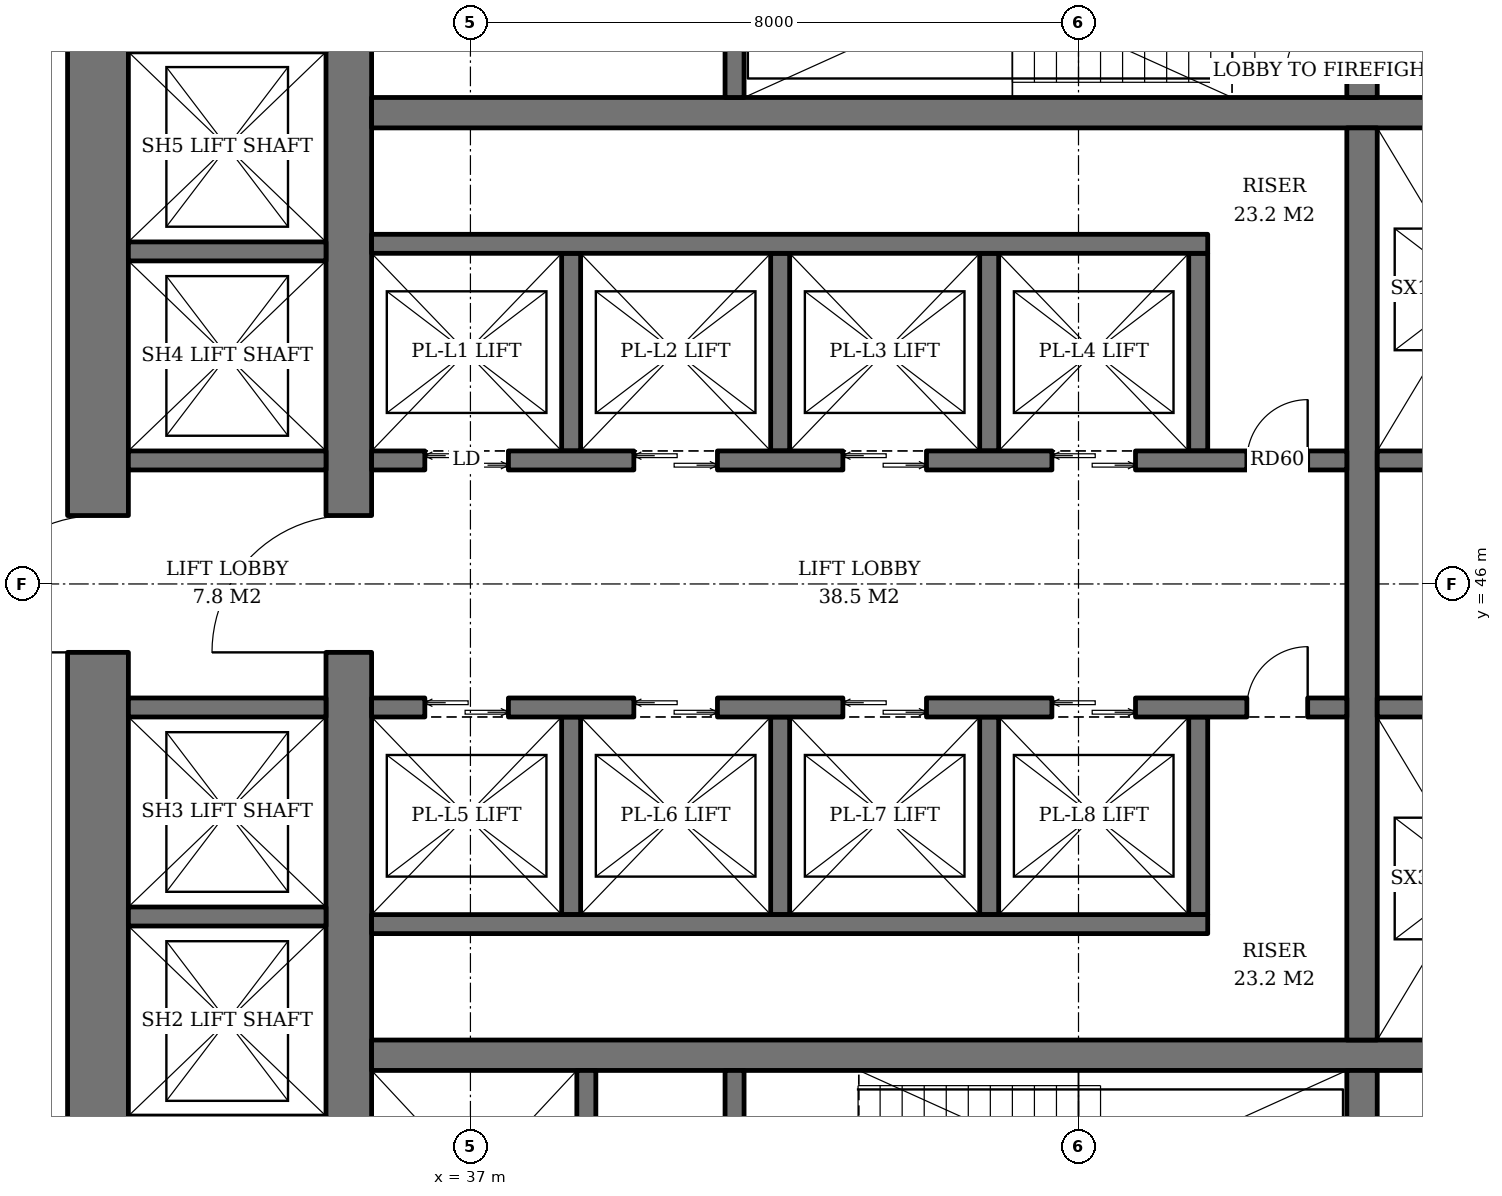
"""IFC4 building model, lengths in metres.
Left out: names, types, materials, properties, quantities, classifications, styles, units other than length and angle.
Written with IfcOpenShell. Run it as: python <this file> out.ifc"""

import sys

from ifc_helpers import new_model, si_unit, direction, frame, frame_2d, origin, place, context, subcontext, project, spatial, rectangle, extrude, element, fill, save


model = new_model("IFC4")
c1 = context("Model", 3, precision=1e-05, world=origin(), true_north=direction((0.0, 1.0)))
c2 = subcontext(c1, "Body", "Model", "MODEL_VIEW")
j1 = project(units=[si_unit("LENGTHUNIT", "METRE"), si_unit("PLANEANGLEUNIT", "RADIAN")], contexts=[c1])
p1 = place(None, origin())
s1 = spatial("IfcSite", under=j1, at=p1, CompositionType="ELEMENT")
p2 = place(p1, origin())
s2 = spatial("IfcBuilding", under=s1, at=p2, CompositionType="ELEMENT")
p3 = place(p2, frame((0.0, 0.0, 55.2)))
s3 = spatial("IfcBuildingStorey", under=s2, at=p3, CompositionType="ELEMENT", Elevation=55.2)
p4 = place(p3, frame((35.4, 36.7, 0.0), z_axis=(0.0, 0.0, 1.0), x_axis=(0.0, 1.0, 0.0)))
e1 = element("IfcWall", 1, at=p4, inside=s3, PredefinedType="SHEAR", context=c2, shape_type="SweptSolid", body=[
    extrude(rectangle(XDim=18.6, YDim=0.6, at=frame_2d((9.3, 0.0))), origin(), (0.0, 0.0, 1.0), 3.8),
])
p5 = place(p4, frame((8.4, 0.0, 0.0)))
e2 = element("IfcOpeningElement", 2, at=p5, cuts=e1, PredefinedType="OPENING", context=c2, shape_type="SweptSolid", body=[
    extrude(rectangle(XDim=1.8, YDim=2.4, at=frame_2d((0.9, 1.2))), frame((0.0, 0.31, 0.0), z_axis=(0.0, -1.0, 0.0), x_axis=(1.0, 0.0, 0.0)), (0.0, 0.0, 1.0), 0.62),
])
p6 = place(p3, frame((32.1, 33.5, 0.0), z_axis=(0.0, 0.0, 1.0), x_axis=(0.0, 1.0, 0.0)))
e3 = element("IfcWall", 3, at=p6, inside=s3, PredefinedType="SHEAR", context=c2, shape_type="SweptSolid", body=[
    extrude(rectangle(XDim=25.0, YDim=0.8, at=frame_2d((12.5, 0.0))), origin(), (0.0, 0.0, 1.0), 3.8),
])
p7 = place(p6, frame((11.6, 0.0, 0.0)))
e4 = element("IfcOpeningElement", 4, at=p7, cuts=e3, PredefinedType="OPENING", context=c2, shape_type="SweptSolid", body=[
    extrude(rectangle(XDim=1.8, YDim=2.4, at=frame_2d((0.9, 1.2))), frame((0.0, 0.41, 0.0), z_axis=(0.0, -1.0, 0.0), x_axis=(1.0, 0.0, 0.0)), (0.0, 0.0, 1.0), 0.82),
])
for number, where, z_axis, x_axis in (
    (5, (35.7, 39.8, 0.0), (0.0, 0.0, 1.0), (1.0, 0.0, 0.0)),
    (6, (35.7, 52.2, 0.0), (0.0, 0.0, 1.0), (1.0, 0.0, 0.0)),
):
    element("IfcWall", number, at=place(p3, frame(where, z_axis=z_axis, x_axis=x_axis)), inside=s3, PredefinedType="SHEAR", context=c2, shape_type="SweptSolid", body=[
        extrude(rectangle(XDim=18.6, YDim=0.4, at=frame_2d((9.3, 0.0))), origin(), (0.0, 0.0, 1.0), 3.8),
    ])
p8 = place(p3, frame((48.73, 36.7, 0.0), z_axis=(0.0, 0.0, 1.0), x_axis=(0.0, 1.0, 0.0)))
e7 = element("IfcWall", 7, at=p8, inside=s3, PredefinedType="SHEAR", context=c2, shape_type="SweptSolid", body=[
    extrude(rectangle(XDim=2.9, YDim=0.4, at=frame_2d((1.45, 0.0))), origin(), (0.0, 0.0, 1.0), 3.8),
])
p9 = place(p3, frame((48.73, 40.0, 0.0), z_axis=(0.0, 0.0, 1.0), x_axis=(0.0, 1.0, 0.0)))
e8 = element("IfcWall", 8, at=p9, inside=s3, PredefinedType="SHEAR", context=c2, shape_type="SweptSolid", body=[
    extrude(rectangle(XDim=12.0, YDim=0.4, at=frame_2d((6.0, 0.0))), origin(), (0.0, 0.0, 1.0), 3.8),
])
p10 = place(p3, frame((48.73, 52.4, 0.0), z_axis=(0.0, 0.0, 1.0), x_axis=(0.0, 1.0, 0.0)))
e9 = element("IfcWall", 9, at=p10, inside=s3, PredefinedType="SHEAR", context=c2, shape_type="SweptSolid", body=[
    extrude(rectangle(XDim=2.9, YDim=0.4, at=frame_2d((1.45, 0.0))), origin(), (0.0, 0.0, 1.0), 3.8),
])
p11 = place(p10, frame((0.3, 0.0, 0.0)))
e10 = element("IfcOpeningElement", 10, at=p11, cuts=e9, PredefinedType="OPENING", context=c2, shape_type="SweptSolid", body=[
    extrude(rectangle(XDim=1.0, YDim=2.1, at=frame_2d((0.5, 1.05))), frame((0.0, 0.21, 0.0), z_axis=(0.0, -1.0, 0.0), x_axis=(1.0, 0.0, 0.0)), (0.0, 0.0, 1.0), 0.42),
])
p12 = place(p3, frame((38.525, 36.7, 0.0), z_axis=(0.0, 0.0, 1.0), x_axis=(0.0, 1.0, 0.0)))
e11 = element("IfcWall", 11, at=p12, inside=s3, PredefinedType="SHEAR", context=c2, shape_type="SweptSolid", body=[
    extrude(rectangle(XDim=2.9, YDim=0.25, at=frame_2d((1.45, 0.0))), origin(), (0.0, 0.0, 1.0), 3.8),
])
p13 = place(p12, frame((0.8, 0.0, 0.0)))
e12 = element("IfcOpeningElement", 12, at=p13, cuts=e11, PredefinedType="OPENING", context=c2, shape_type="SweptSolid", body=[
    extrude(rectangle(XDim=1.3, YDim=2.2, at=frame_2d((0.65, 1.1))), frame((0.0, 0.135, 0.0), z_axis=(0.0, -1.0, 0.0), x_axis=(1.0, 0.0, 0.0)), (0.0, 0.0, 1.0), 0.27),
])
p14 = place(p3, frame((40.475, 36.7, 0.0), z_axis=(0.0, 0.0, 1.0), x_axis=(0.0, 1.0, 0.0)))
e13 = element("IfcWall", 13, at=p14, inside=s3, PredefinedType="SHEAR", context=c2, shape_type="SweptSolid", body=[
    extrude(rectangle(XDim=2.9, YDim=0.25, at=frame_2d((1.45, 0.0))), origin(), (0.0, 0.0, 1.0), 3.8),
])
p15 = place(p14, frame((0.75, 0.0, 0.0)))
e14 = element("IfcOpeningElement", 14, at=p15, cuts=e13, PredefinedType="OPENING", context=c2, shape_type="SweptSolid", body=[
    extrude(rectangle(XDim=1.2, YDim=2.1, at=frame_2d((0.6, 1.05))), frame((0.0, 0.135, 0.0), z_axis=(0.0, -1.0, 0.0), x_axis=(1.0, 0.0, 0.0)), (0.0, 0.0, 1.0), 0.27),
])
p16 = place(p3, frame((40.475, 52.4, 0.0), z_axis=(0.0, 0.0, 1.0), x_axis=(0.0, 1.0, 0.0)))
e15 = element("IfcWall", 15, at=p16, inside=s3, PredefinedType="SHEAR", context=c2, shape_type="SweptSolid", body=[
    extrude(rectangle(XDim=2.9, YDim=0.25, at=frame_2d((1.45, 0.0))), origin(), (0.0, 0.0, 1.0), 3.8),
])
for number, where, z_axis, x_axis in (
    (16, (38.325, 47.75, 0.0), (0.0, 0.0, 1.0), (0.0, 1.0, 0.0)),
    (17, (41.075, 47.75, 0.0), (0.0, 0.0, 1.0), (0.0, 1.0, 0.0)),
    (18, (43.825, 47.75, 0.0), (0.0, 0.0, 1.0), (0.0, 1.0, 0.0)),
    (19, (46.575, 47.75, 0.0), (0.0, 0.0, 1.0), (0.0, 1.0, 0.0)),
):
    element("IfcWall", number, at=place(p3, frame(where, z_axis=z_axis, x_axis=x_axis)), inside=s3, PredefinedType="SHEAR", context=c2, shape_type="SweptSolid", body=[
        extrude(rectangle(XDim=2.6, YDim=0.25, at=frame_2d((1.3, 0.0))), origin(), (0.0, 0.0, 1.0), 3.8),
    ])
p17 = place(p3, frame((35.7, 50.475, 0.0), z_axis=(0.0, 0.0, 1.0), x_axis=(1.0, 0.0, 0.0)))
e20 = element("IfcWall", 20, at=p17, inside=s3, PredefinedType="SHEAR", context=c2, shape_type="SweptSolid", body=[
    extrude(rectangle(XDim=11.0, YDim=0.25, at=frame_2d((5.5, 0.0))), origin(), (0.0, 0.0, 1.0), 3.8),
])
p18 = place(p3, frame((35.7, 47.625, 0.0), z_axis=(0.0, 0.0, 1.0), x_axis=(1.0, 0.0, 0.0)))
e21 = element("IfcWall", 21, at=p18, inside=s3, PredefinedType="SHEAR", context=c2, shape_type="SweptSolid", body=[
    extrude(rectangle(XDim=12.83, YDim=0.25, at=frame_2d((6.415, 0.0))), origin(), (0.0, 0.0, 1.0), 3.8),
])
p19 = place(p18, frame((0.7, 0.0, 0.0)))
e22 = element("IfcOpeningElement", 22, at=p19, cuts=e21, PredefinedType="OPENING", context=c2, shape_type="SweptSolid", body=[
    extrude(rectangle(XDim=1.1, YDim=2.2, at=frame_2d((0.55, 1.1))), frame((0.0, 0.135, 0.0), z_axis=(0.0, -1.0, 0.0), x_axis=(1.0, 0.0, 0.0)), (0.0, 0.0, 1.0), 0.27),
])
p20 = place(p18, frame((3.45, 0.0, 0.0)))
e23 = element("IfcOpeningElement", 23, at=p20, cuts=e21, PredefinedType="OPENING", context=c2, shape_type="SweptSolid", body=[
    extrude(rectangle(XDim=1.1, YDim=2.2, at=frame_2d((0.55, 1.1))), frame((0.0, 0.135, 0.0), z_axis=(0.0, -1.0, 0.0), x_axis=(1.0, 0.0, 0.0)), (0.0, 0.0, 1.0), 0.27),
])
p21 = place(p18, frame((6.2, 0.0, 0.0)))
e24 = element("IfcOpeningElement", 24, at=p21, cuts=e21, PredefinedType="OPENING", context=c2, shape_type="SweptSolid", body=[
    extrude(rectangle(XDim=1.1, YDim=2.2, at=frame_2d((0.55, 1.1))), frame((0.0, 0.135, 0.0), z_axis=(0.0, -1.0, 0.0), x_axis=(1.0, 0.0, 0.0)), (0.0, 0.0, 1.0), 0.27),
])
p22 = place(p18, frame((8.95, 0.0, 0.0)))
e25 = element("IfcOpeningElement", 25, at=p22, cuts=e21, PredefinedType="OPENING", context=c2, shape_type="SweptSolid", body=[
    extrude(rectangle(XDim=1.1, YDim=2.2, at=frame_2d((0.55, 1.1))), frame((0.0, 0.135, 0.0), z_axis=(0.0, -1.0, 0.0), x_axis=(1.0, 0.0, 0.0)), (0.0, 0.0, 1.0), 0.27),
])
p23 = place(p18, frame((11.515, 0.0, 0.0)))
e26 = element("IfcOpeningElement", 26, at=p23, cuts=e21, PredefinedType="OPENING", context=c2, shape_type="SweptSolid", body=[
    extrude(rectangle(XDim=0.8, YDim=2.0, at=frame_2d((0.4, 1.0))), frame((0.0, 0.135, 0.0), z_axis=(0.0, -1.0, 0.0), x_axis=(1.0, 0.0, 0.0)), (0.0, 0.0, 1.0), 0.27),
])
for number, where, z_axis, x_axis in (
    (27, (38.325, 44.25, 0.0), (0.0, 0.0, 1.0), (0.0, -1.0, 0.0)),
    (28, (41.075, 44.25, 0.0), (0.0, 0.0, 1.0), (0.0, -1.0, 0.0)),
    (29, (43.825, 44.25, 0.0), (0.0, 0.0, 1.0), (0.0, -1.0, 0.0)),
    (30, (46.575, 44.25, 0.0), (0.0, 0.0, 1.0), (0.0, -1.0, 0.0)),
):
    element("IfcWall", number, at=place(p3, frame(where, z_axis=z_axis, x_axis=x_axis)), inside=s3, PredefinedType="SHEAR", context=c2, shape_type="SweptSolid", body=[
        extrude(rectangle(XDim=2.6, YDim=0.25, at=frame_2d((1.3, 0.0))), origin(), (0.0, 0.0, 1.0), 3.8),
    ])
p24 = place(p3, frame((35.7, 41.525, 0.0), z_axis=(0.0, 0.0, 1.0), x_axis=(1.0, 0.0, 0.0)))
e31 = element("IfcWall", 31, at=p24, inside=s3, PredefinedType="SHEAR", context=c2, shape_type="SweptSolid", body=[
    extrude(rectangle(XDim=11.0, YDim=0.25, at=frame_2d((5.5, 0.0))), origin(), (0.0, 0.0, 1.0), 3.8),
])
p25 = place(p3, frame((35.7, 44.375, 0.0), z_axis=(0.0, 0.0, 1.0), x_axis=(1.0, 0.0, 0.0)))
e32 = element("IfcWall", 32, at=p25, inside=s3, PredefinedType="SHEAR", context=c2, shape_type="SweptSolid", body=[
    extrude(rectangle(XDim=12.83, YDim=0.25, at=frame_2d((6.415, 0.0))), origin(), (0.0, 0.0, 1.0), 3.8),
])
p26 = place(p25, frame((0.7, 0.0, 0.0)))
e33 = element("IfcOpeningElement", 33, at=p26, cuts=e32, PredefinedType="OPENING", context=c2, shape_type="SweptSolid", body=[
    extrude(rectangle(XDim=1.1, YDim=2.2, at=frame_2d((0.55, 1.1))), frame((0.0, 0.135, 0.0), z_axis=(0.0, -1.0, 0.0), x_axis=(1.0, 0.0, 0.0)), (0.0, 0.0, 1.0), 0.27),
])
p27 = place(p25, frame((3.45, 0.0, 0.0)))
e34 = element("IfcOpeningElement", 34, at=p27, cuts=e32, PredefinedType="OPENING", context=c2, shape_type="SweptSolid", body=[
    extrude(rectangle(XDim=1.1, YDim=2.2, at=frame_2d((0.55, 1.1))), frame((0.0, 0.135, 0.0), z_axis=(0.0, -1.0, 0.0), x_axis=(1.0, 0.0, 0.0)), (0.0, 0.0, 1.0), 0.27),
])
p28 = place(p25, frame((6.2, 0.0, 0.0)))
e35 = element("IfcOpeningElement", 35, at=p28, cuts=e32, PredefinedType="OPENING", context=c2, shape_type="SweptSolid", body=[
    extrude(rectangle(XDim=1.1, YDim=2.2, at=frame_2d((0.55, 1.1))), frame((0.0, 0.135, 0.0), z_axis=(0.0, -1.0, 0.0), x_axis=(1.0, 0.0, 0.0)), (0.0, 0.0, 1.0), 0.27),
])
p29 = place(p25, frame((8.95, 0.0, 0.0)))
e36 = element("IfcOpeningElement", 36, at=p29, cuts=e32, PredefinedType="OPENING", context=c2, shape_type="SweptSolid", body=[
    extrude(rectangle(XDim=1.1, YDim=2.2, at=frame_2d((0.55, 1.1))), frame((0.0, 0.135, 0.0), z_axis=(0.0, -1.0, 0.0), x_axis=(1.0, 0.0, 0.0)), (0.0, 0.0, 1.0), 0.27),
])
p30 = place(p25, frame((11.515, 0.0, 0.0)))
e37 = element("IfcOpeningElement", 37, at=p30, cuts=e32, PredefinedType="OPENING", context=c2, shape_type="SweptSolid", body=[
    extrude(rectangle(XDim=0.8, YDim=2.0, at=frame_2d((0.4, 1.0))), frame((0.0, 0.135, 0.0), z_axis=(0.0, -1.0, 0.0), x_axis=(1.0, 0.0, 0.0)), (0.0, 0.0, 1.0), 0.27),
])
for number, where, z_axis, x_axis in (
    (38, (48.93, 47.625, 0.0), (0.0, 0.0, 1.0), (1.0, 0.0, 0.0)),
    (39, (48.93, 44.375, 0.0), (0.0, 0.0, 1.0), (1.0, 0.0, 0.0)),
):
    element("IfcWall", number, at=place(p3, frame(where, z_axis=z_axis, x_axis=x_axis)), inside=s3, PredefinedType="SHEAR", context=c2, shape_type="SweptSolid", body=[
        extrude(rectangle(XDim=5.37, YDim=0.25, at=frame_2d((2.685, 0.0))), origin(), (0.0, 0.0, 1.0), 3.8),
    ])
for number, where, z_axis, x_axis in (
    (40, (32.5, 41.625, 0.0), (0.0, 0.0, 1.0), (1.0, 0.0, 0.0)),
    (41, (32.5, 44.375, 0.0), (0.0, 0.0, 1.0), (1.0, 0.0, 0.0)),
    (42, (32.5, 47.625, 0.0), (0.0, 0.0, 1.0), (1.0, 0.0, 0.0)),
    (43, (32.5, 50.375, 0.0), (0.0, 0.0, 1.0), (1.0, 0.0, 0.0)),
):
    element("IfcWall", number, at=place(p3, frame(where, z_axis=z_axis, x_axis=x_axis)), inside=s3, PredefinedType="SHEAR", context=c2, shape_type="SweptSolid", body=[
        extrude(rectangle(XDim=2.6, YDim=0.25, at=frame_2d((1.3, 0.0))), origin(), (0.0, 0.0, 1.0), 3.8),
    ])
p31 = place(p19, origin())
e44 = element("IfcDoor", 44, at=p31, inside=s3, OperationType="DOUBLE_DOOR_SLIDING", PredefinedType="DOOR", context=c2, shape_type="SweptSolid", body=[
    extrude(rectangle(XDim=1.1, YDim=2.2, at=frame_2d((0.55, 1.1))), frame((0.0, 0.025, 0.0), z_axis=(0.0, -1.0, 0.0), x_axis=(1.0, 0.0, 0.0)), (0.0, 0.0, 1.0), 0.05),
])
fill(e22, e44)
p32 = place(p20, origin())
e45 = element("IfcDoor", 45, at=p32, inside=s3, OperationType="DOUBLE_DOOR_SLIDING", PredefinedType="DOOR", context=c2, shape_type="SweptSolid", body=[
    extrude(rectangle(XDim=1.1, YDim=2.2, at=frame_2d((0.55, 1.1))), frame((0.0, 0.025, 0.0), z_axis=(0.0, -1.0, 0.0), x_axis=(1.0, 0.0, 0.0)), (0.0, 0.0, 1.0), 0.05),
])
fill(e23, e45)
p33 = place(p21, origin())
e46 = element("IfcDoor", 46, at=p33, inside=s3, OperationType="DOUBLE_DOOR_SLIDING", PredefinedType="DOOR", context=c2, shape_type="SweptSolid", body=[
    extrude(rectangle(XDim=1.1, YDim=2.2, at=frame_2d((0.55, 1.1))), frame((0.0, 0.025, 0.0), z_axis=(0.0, -1.0, 0.0), x_axis=(1.0, 0.0, 0.0)), (0.0, 0.0, 1.0), 0.05),
])
fill(e24, e46)
p34 = place(p22, origin())
e47 = element("IfcDoor", 47, at=p34, inside=s3, OperationType="DOUBLE_DOOR_SLIDING", PredefinedType="DOOR", context=c2, shape_type="SweptSolid", body=[
    extrude(rectangle(XDim=1.1, YDim=2.2, at=frame_2d((0.55, 1.1))), frame((0.0, 0.025, 0.0), z_axis=(0.0, -1.0, 0.0), x_axis=(1.0, 0.0, 0.0)), (0.0, 0.0, 1.0), 0.05),
])
fill(e25, e47)
p35 = place(p23, origin())
e48 = element("IfcDoor", 48, at=p35, inside=s3, OperationType="SINGLE_SWING_RIGHT", PredefinedType="DOOR", context=c2, shape_type="SweptSolid", body=[
    extrude(rectangle(XDim=0.8, YDim=2.0, at=frame_2d((0.4, 1.0))), frame((0.0, 0.025, 0.0), z_axis=(0.0, -1.0, 0.0), x_axis=(1.0, 0.0, 0.0)), (0.0, 0.0, 1.0), 0.05),
])
fill(e26, e48)
p36 = place(p26, origin())
e49 = element("IfcDoor", 49, at=p36, inside=s3, OperationType="DOUBLE_DOOR_SLIDING", PredefinedType="DOOR", context=c2, shape_type="SweptSolid", body=[
    extrude(rectangle(XDim=1.1, YDim=2.2, at=frame_2d((0.55, 1.1))), frame((0.0, 0.025, 0.0), z_axis=(0.0, -1.0, 0.0), x_axis=(1.0, 0.0, 0.0)), (0.0, 0.0, 1.0), 0.05),
])
fill(e33, e49)
p37 = place(p27, origin())
e50 = element("IfcDoor", 50, at=p37, inside=s3, OperationType="DOUBLE_DOOR_SLIDING", PredefinedType="DOOR", context=c2, shape_type="SweptSolid", body=[
    extrude(rectangle(XDim=1.1, YDim=2.2, at=frame_2d((0.55, 1.1))), frame((0.0, 0.025, 0.0), z_axis=(0.0, -1.0, 0.0), x_axis=(1.0, 0.0, 0.0)), (0.0, 0.0, 1.0), 0.05),
])
fill(e34, e50)
p38 = place(p28, origin())
e51 = element("IfcDoor", 51, at=p38, inside=s3, OperationType="DOUBLE_DOOR_SLIDING", PredefinedType="DOOR", context=c2, shape_type="SweptSolid", body=[
    extrude(rectangle(XDim=1.1, YDim=2.2, at=frame_2d((0.55, 1.1))), frame((0.0, 0.025, 0.0), z_axis=(0.0, -1.0, 0.0), x_axis=(1.0, 0.0, 0.0)), (0.0, 0.0, 1.0), 0.05),
])
fill(e35, e51)
p39 = place(p29, origin())
e52 = element("IfcDoor", 52, at=p39, inside=s3, OperationType="DOUBLE_DOOR_SLIDING", PredefinedType="DOOR", context=c2, shape_type="SweptSolid", body=[
    extrude(rectangle(XDim=1.1, YDim=2.2, at=frame_2d((0.55, 1.1))), frame((0.0, 0.025, 0.0), z_axis=(0.0, -1.0, 0.0), x_axis=(1.0, 0.0, 0.0)), (0.0, 0.0, 1.0), 0.05),
])
fill(e36, e52)
p40 = place(p30, origin())
e53 = element("IfcDoor", 53, at=p40, inside=s3, OperationType="SINGLE_SWING_RIGHT", PredefinedType="DOOR", context=c2, shape_type="SweptSolid", body=[
    extrude(rectangle(XDim=0.8, YDim=2.0, at=frame_2d((0.4, 1.0))), frame((0.0, 0.025, 0.0), z_axis=(0.0, -1.0, 0.0), x_axis=(1.0, 0.0, 0.0)), (0.0, 0.0, 1.0), 0.05),
])
fill(e37, e53)
p41 = place(p11, origin())
e54 = element("IfcDoor", 54, at=p41, inside=s3, OperationType="SINGLE_SWING_LEFT", PredefinedType="DOOR", context=c2, shape_type="SweptSolid", body=[
    extrude(rectangle(XDim=1.0, YDim=2.1, at=frame_2d((0.5, 1.05))), frame((0.0, 0.025, 0.0), z_axis=(0.0, -1.0, 0.0), x_axis=(1.0, 0.0, 0.0)), (0.0, 0.0, 1.0), 0.05),
])
fill(e10, e54)
p42 = place(p5, origin())
e55 = element("IfcDoor", 55, at=p42, inside=s3, OperationType="DOUBLE_DOOR_SINGLE_SWING", PredefinedType="DOOR", context=c2, shape_type="SweptSolid", body=[
    extrude(rectangle(XDim=1.8, YDim=2.4, at=frame_2d((0.9, 1.2))), frame((0.0, 0.025, 0.0), z_axis=(0.0, -1.0, 0.0), x_axis=(1.0, 0.0, 0.0)), (0.0, 0.0, 1.0), 0.05),
])
fill(e2, e55)
p43 = place(p7, origin())
e56 = element("IfcDoor", 56, at=p43, inside=s3, OperationType="DOUBLE_DOOR_SINGLE_SWING", PredefinedType="DOOR", context=c2, shape_type="SweptSolid", body=[
    extrude(rectangle(XDim=1.8, YDim=2.4, at=frame_2d((0.9, 1.2))), frame((0.0, 0.025, 0.0), z_axis=(0.0, -1.0, 0.0), x_axis=(1.0, 0.0, 0.0)), (0.0, 0.0, 1.0), 0.05),
])
fill(e4, e56)
save(model, sys.argv[1])
